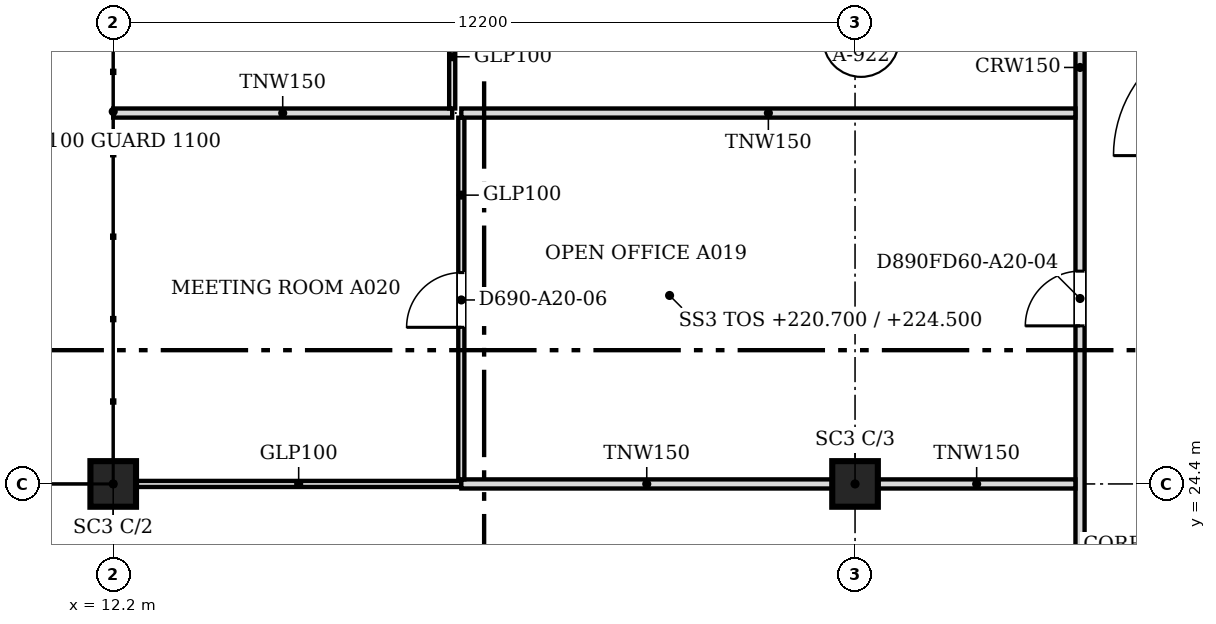
"""IFC4 building model, lengths in metres.
Left out: names, types, materials, properties, quantities, classifications, styles, units other than length and angle.
Written with IfcOpenShell. Run it as: python <this file> out.ifc"""

import sys

from ifc_helpers import new_model, si_unit, direction, frame, frame_2d, origin, origin_2d, place, context, subcontext, project, spatial, rectangle, extrude, source, transform, mapped, element, fill, save


model = new_model("IFC4")
c1 = context("Model", 3, precision=1e-05, world=origin(), true_north=direction((0.0, 1.0)))
c2 = subcontext(c1, "Body", "Model", "MODEL_VIEW")
j1 = project(units=[si_unit("LENGTHUNIT", "METRE"), si_unit("PLANEANGLEUNIT", "RADIAN")], contexts=[c1])
p1 = place(None, origin())
s1 = spatial("IfcSite", under=j1, at=p1, CompositionType="ELEMENT")
p2 = place(p1, origin())
s2 = spatial("IfcBuilding", under=s1, at=p2, CompositionType="ELEMENT")
p3 = place(p2, frame((0.0, 0.0, 220.7)))
s3 = spatial("IfcBuildingStorey", under=s2, at=p3, CompositionType="ELEMENT", Elevation=220.7)
for number, where, z_axis, x_axis in (
    (1, (12.2, 24.4, 0.0), (0.0, 0.0, 1.0), (1.0, 0.0, 0.0)),
    (2, (24.4, 24.4, 0.0), (0.0, 0.0, 1.0), (1.0, 0.0, 0.0)),
):
    element("IfcColumn", number, at=place(p3, frame(where, z_axis=z_axis, x_axis=x_axis)), inside=s3, PredefinedType="COLUMN", context=c2, shape_type="SweptSolid", body=[
        extrude(rectangle(XDim=0.75, YDim=0.75, at=origin_2d()), origin(), (0.0, 0.0, 1.0), 3.6),
    ])
p4 = place(p3, frame((28.1, 18.8, 0.0), z_axis=(0.0, 0.0, 1.0), x_axis=(0.0, 1.0, 0.0)))
e3 = element("IfcWall", 3, at=p4, inside=s3, PredefinedType="PARTITIONING", context=c2, shape_type="SweptSolid", body=[
    extrude(rectangle(XDim=26.424, YDim=0.15, at=frame_2d((13.212, 0.0))), origin(), (0.0, 0.0, 1.0), 3.067),
])
m1 = source(origin(), c2, "Body", "SweptSolid", [
    extrude(rectangle(XDim=0.9, YDim=2.1, at=frame_2d((0.45, 1.05))), frame((0.0, 0.085, 0.0), z_axis=(0.0, -1.0, 0.0), x_axis=(1.0, 0.0, 0.0)), (0.0, 0.0, 1.0), 0.17),
])
p5 = place(p4, frame((1.1, 0.0, 0.0)))
e4 = element("IfcOpeningElement", 4, at=p5, cuts=e3, PredefinedType="OPENING", context=c2, shape_type="MappedRepresentation", body=[
    mapped(m1, transform((0.0, 0.0, 0.0), scale=1.0)),
])
p6 = place(p4, frame((23.151, 0.0, 0.0)))
e5 = element("IfcOpeningElement", 5, at=p6, cuts=e3, PredefinedType="OPENING", context=c2, shape_type="MappedRepresentation", body=[
    mapped(m1, transform((0.0, 0.0, 0.0), scale=1.0)),
])
p7 = place(p4, frame((8.2, 0.0, 0.0)))
e6 = element("IfcOpeningElement", 6, at=p7, cuts=e3, PredefinedType="OPENING", context=c2, shape_type="MappedRepresentation", body=[
    mapped(m1, transform((0.0, 0.0, 0.0), scale=1.0)),
])
p8 = place(p4, frame((15.8, 0.0, 0.0)))
e7 = element("IfcOpeningElement", 7, at=p8, cuts=e3, PredefinedType="OPENING", context=c2, shape_type="MappedRepresentation", body=[
    mapped(m1, transform((0.0, 0.0, 0.0), scale=1.0)),
])
p9 = place(p3, frame((12.576, 24.4, 0.0), z_axis=(0.0, 0.0, 1.0), x_axis=(1.0, 0.0, 0.0)))
e8 = element("IfcWall", 8, at=p9, inside=s3, PredefinedType="PARTITIONING", context=c2, shape_type="SweptSolid", body=[
    extrude(rectangle(XDim=5.348, YDim=0.1, at=frame_2d((2.674, 0.0))), origin(), (0.0, 0.0, 1.0), 3.067),
])
p10 = place(p3, frame((17.925, 24.4, 0.0), z_axis=(0.0, 0.0, 1.0), x_axis=(1.0, 0.0, 0.0)))
e9 = element("IfcWall", 9, at=p10, inside=s3, PredefinedType="PARTITIONING", context=c2, shape_type="SweptSolid", body=[
    extrude(rectangle(XDim=6.099, YDim=0.15, at=frame_2d((3.049, 0.0))), origin(), (0.0, 0.0, 1.0), 3.067),
])
p11 = place(p3, frame((24.776, 24.4, 0.0), z_axis=(0.0, 0.0, 1.0), x_axis=(1.0, 0.0, 0.0)))
e10 = element("IfcWall", 10, at=p11, inside=s3, PredefinedType="PARTITIONING", context=c2, shape_type="SweptSolid", body=[
    extrude(rectangle(XDim=3.248, YDim=0.15, at=frame_2d((1.624, 0.0))), origin(), (0.0, 0.0, 1.0), 3.067),
])
p12 = place(p3, frame((17.925, 24.476, 0.0), z_axis=(0.0, 0.0, 1.0), x_axis=(0.0, 1.0, 0.0)))
e11 = element("IfcWall", 11, at=p12, inside=s3, PredefinedType="PARTITIONING", context=c2, shape_type="SweptSolid", body=[
    extrude(rectangle(XDim=5.948, YDim=0.1, at=frame_2d((2.974, 0.0))), origin(), (0.0, 0.0, 1.0), 3.067),
])
m2 = source(origin(), c2, "Body", "SweptSolid", [
    extrude(rectangle(XDim=0.9, YDim=2.1, at=frame_2d((0.45, 1.05))), frame((0.0, 0.06, 0.0), z_axis=(0.0, -1.0, 0.0), x_axis=(1.0, 0.0, 0.0)), (0.0, 0.0, 1.0), 0.12),
])
p13 = place(p12, frame((2.5, 0.0, 0.0)))
e12 = element("IfcOpeningElement", 12, at=p13, cuts=e11, PredefinedType="OPENING", context=c2, shape_type="MappedRepresentation", body=[
    mapped(m2, transform((0.0, 0.0, 0.0), scale=1.0)),
])
p14 = place(p3, frame((12.2, 30.5, 0.0), z_axis=(0.0, 0.0, 1.0), x_axis=(1.0, 0.0, 0.0)))
e13 = element("IfcWall", 13, at=p14, inside=s3, PredefinedType="PARTITIONING", context=c2, shape_type="SweptSolid", body=[
    extrude(rectangle(XDim=5.575, YDim=0.15, at=frame_2d((2.788, 0.0))), origin(), (0.0, 0.0, 1.0), 3.067),
])
p15 = place(p3, frame((17.925, 30.5, 0.0), z_axis=(0.0, 0.0, 1.0), x_axis=(1.0, 0.0, 0.0)))
e14 = element("IfcWall", 14, at=p15, inside=s3, PredefinedType="PARTITIONING", context=c2, shape_type="SweptSolid", body=[
    extrude(rectangle(XDim=10.099, YDim=0.15, at=frame_2d((5.049, 0.0))), origin(), (0.0, 0.0, 1.0), 3.067),
])
p16 = place(p3, frame((17.775, 30.576, 0.0), z_axis=(0.0, 0.0, 1.0), x_axis=(0.0, 1.0, 0.0)))
e15 = element("IfcWall", 15, at=p16, inside=s3, PredefinedType="PARTITIONING", context=c2, shape_type="SweptSolid", body=[
    extrude(rectangle(XDim=4.293, YDim=0.1, at=frame_2d((2.147, 0.0))), origin(), (0.0, 0.0, 1.0), 3.067),
])
p17 = place(p16, frame((1.7, 0.0, 0.0)))
e16 = element("IfcOpeningElement", 16, at=p17, cuts=e15, PredefinedType="OPENING", context=c2, shape_type="MappedRepresentation", body=[
    mapped(m2, transform((0.0, 0.0, 0.0), scale=1.0)),
])
m3 = source(origin(), c2, "Body", "SweptSolid", [
    extrude(rectangle(XDim=0.9, YDim=2.1, at=frame_2d((0.45, 1.05))), frame((0.0, 0.025, 0.0), z_axis=(0.0, -1.0, 0.0), x_axis=(1.0, 0.0, 0.0)), (0.0, 0.0, 1.0), 0.05),
])
p18 = place(p13, origin())
e17 = element("IfcDoor", 17, at=p18, inside=s3, OperationType="SINGLE_SWING_LEFT", PredefinedType="DOOR", context=c2, shape_type="MappedRepresentation", body=[
    mapped(m3, transform((0.0, 0.0, 0.0), scale=1.0)),
])
fill(e12, e17)
p19 = place(p7, origin())
e18 = element("IfcDoor", 18, at=p19, inside=s3, OperationType="SINGLE_SWING_LEFT", PredefinedType="DOOR", context=c2, shape_type="MappedRepresentation", body=[
    mapped(m3, transform((0.0, 0.0, 0.0), scale=1.0)),
])
fill(e6, e18)
save(model, sys.argv[1])
